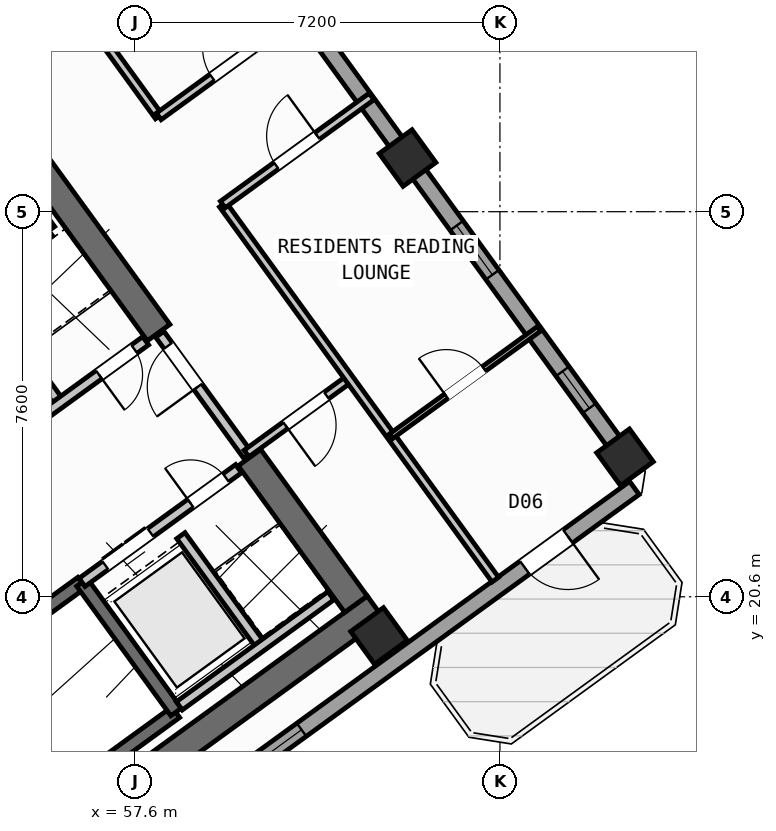
"""IFC4 building model, lengths in metres.
Left out: names, types, materials, properties, quantities, classifications, styles, units other than length and angle.
Written with IfcOpenShell. Run it as: python <this file> out.ifc"""

import sys

from ifc_helpers import new_model, si_unit, direction, frame, frame_2d, origin, origin_2d, place, context, subcontext, project, spatial, rectangle, hollow_rectangle, extrude, source, transform, mapped, element, fill, save


model = new_model("IFC4")
c1 = context("Model", 3, precision=1e-05, world=origin(), true_north=direction((0.0, 1.0)))
c2 = subcontext(c1, "Body", "Model", "MODEL_VIEW")
j1 = project(units=[si_unit("LENGTHUNIT", "METRE"), si_unit("PLANEANGLEUNIT", "RADIAN")], contexts=[c1])
p1 = place(None, origin())
s1 = spatial("IfcSite", under=j1, at=p1, CompositionType="ELEMENT")
p2 = place(p1, origin())
s2 = spatial("IfcBuilding", under=s1, at=p2, CompositionType="ELEMENT")
p3 = place(p2, frame((0.0, 0.0, 187.8)))
s3 = spatial("IfcBuildingStorey", under=s2, at=p3, CompositionType="ELEMENT", Elevation=187.8)
p4 = place(p3, frame((52.359, 13.14, 0.0), z_axis=(0.0, 0.0, 1.0), x_axis=(0.809014896919, 0.587788139183, 0.0)))
e1 = element("IfcWall", 1, at=p4, inside=s3, PredefinedType="SHEAR", context=c2, shape_type="SweptSolid", body=[
    extrude(rectangle(XDim=12.34, YDim=0.55, at=frame_2d((6.17, 0.0))), origin(), (0.0, 0.0, 1.0), 3.35),
])
p5 = place(p3, frame((61.958, 20.454, 0.0), z_axis=(0.0, 0.0, 1.0), x_axis=(-0.587802113096, 0.809004744015, 0.0)))
e2 = element("IfcWall", 2, at=p5, inside=s3, PredefinedType="SHEAR", context=c2, shape_type="SweptSolid", body=[
    extrude(rectangle(XDim=3.575, YDim=0.55, at=frame_2d((1.788, 0.0))), origin(), (0.0, 0.0, 1.0), 3.35),
])
p6 = place(p3, frame((58.064, 25.813, 0.0), z_axis=(0.0, 0.0, 1.0), x_axis=(-0.587764933797, 0.809031756236, 0.0)))
e3 = element("IfcWall", 3, at=p6, inside=s3, PredefinedType="SHEAR", context=c2, shape_type="SweptSolid", body=[
    extrude(rectangle(XDim=6.425, YDim=0.55, at=frame_2d((3.212, 0.0))), origin(), (0.0, 0.0, 1.0), 3.35),
])
m1 = source(origin(), c2, "Body", "SweptSolid", [
    extrude(hollow_rectangle(XDim=0.8, YDim=0.8, WallThickness=0.032, at=origin_2d()), origin(), (0.0, 0.0, 1.0), 3.6),
])
for number, where, z_axis, x_axis in (
    (4, (62.414, 19.827, 0.0), (0.0, 0.0, 1.0), (0.809, 0.588, 0.0)),
    (5, (67.268, 23.354, 0.0), (0.0, 0.0, 1.0), (0.809, 0.588, 0.0)),
    (6, (62.977, 29.259, 0.0), (0.0, 0.0, 1.0), (0.809, 0.588, 0.0)),
):
    element("IfcColumn", number, at=place(p3, frame(where, z_axis=z_axis, x_axis=x_axis)), inside=s3, PredefinedType="COLUMN", context=c2, shape_type="MappedRepresentation", body=[
        mapped(m1, transform((0.0, 0.0, 0.0), scale=1.0)),
    ])
p7 = place(p3, frame((54.81, 40.5, 0.0), z_axis=(0.0, 0.0, 1.0), x_axis=(0.587783625747, -0.809018176127, 0.0)))
e7 = element("IfcWall", 7, at=p7, inside=s3, PredefinedType="STANDARD", context=c2, shape_type="SweptSolid", body=[
    extrude(rectangle(XDim=21.587, YDim=0.32, at=frame_2d((10.794, 0.0))), origin(), (0.0, 0.0, 1.0), 2.825),
])
p8 = place(p7, frame((1.328, 0.0, 0.85)))
e8 = element("IfcOpeningElement", 8, at=p8, cuts=e7, PredefinedType="OPENING", context=c2, shape_type="SweptSolid", body=[
    extrude(rectangle(XDim=1.8, YDim=1.5, at=frame_2d((0.9, 0.75))), frame((0.0, 0.17, 0.0), z_axis=(0.0, -1.0, 0.0), x_axis=(1.0, 0.0, 0.0)), (0.0, 0.0, 1.0), 0.34),
])
p9 = place(p7, frame((4.695, 0.0, 1.0)))
e9 = element("IfcOpeningElement", 9, at=p9, cuts=e7, PredefinedType="OPENING", context=c2, shape_type="SweptSolid", body=[
    extrude(rectangle(XDim=0.9, YDim=1.25, at=frame_2d((0.45, 0.625))), frame((0.0, 0.17, 0.0), z_axis=(0.0, -1.0, 0.0), x_axis=(1.0, 0.0, 0.0)), (0.0, 0.0, 1.0), 0.34),
])
p10 = place(p7, frame((7.829, 0.0, 0.85)))
e10 = element("IfcOpeningElement", 10, at=p10, cuts=e7, PredefinedType="OPENING", context=c2, shape_type="SweptSolid", body=[
    extrude(rectangle(XDim=1.5, YDim=1.5, at=frame_2d((0.75, 0.75))), frame((0.0, 0.17, 0.0), z_axis=(0.0, -1.0, 0.0), x_axis=(1.0, 0.0, 0.0)), (0.0, 0.0, 1.0), 0.34),
])
p11 = place(p7, frame((15.542, 0.0, 0.95)))
e11 = element("IfcOpeningElement", 11, at=p11, cuts=e7, PredefinedType="OPENING", context=c2, shape_type="SweptSolid", body=[
    extrude(rectangle(XDim=1.2, YDim=1.4, at=frame_2d((0.6, 0.7))), frame((0.0, 0.17, 0.0), z_axis=(0.0, -1.0, 0.0), x_axis=(1.0, 0.0, 0.0)), (0.0, 0.0, 1.0), 0.34),
])
p12 = place(p7, frame((19.097, 0.0, 1.0)))
e12 = element("IfcOpeningElement", 12, at=p12, cuts=e7, PredefinedType="OPENING", context=c2, shape_type="SweptSolid", body=[
    extrude(rectangle(XDim=0.9, YDim=1.25, at=frame_2d((0.45, 0.625))), frame((0.0, 0.17, 0.0), z_axis=(0.0, -1.0, 0.0), x_axis=(1.0, 0.0, 0.0)), (0.0, 0.0, 1.0), 0.34),
])
p13 = place(p3, frame((67.454, 22.747, 0.0), z_axis=(0.0, 0.0, 1.0), x_axis=(-0.809021120468, -0.587779573171, 0.0)))
e13 = element("IfcWall", 13, at=p13, inside=s3, PredefinedType="STANDARD", context=c2, shape_type="SweptSolid", body=[
    extrude(rectangle(XDim=17.588, YDim=0.32, at=frame_2d((8.794, 0.0))), origin(), (0.0, 0.0, 1.0), 3.35),
])
p14 = place(p13, frame((1.624, 0.0, 0.0)))
e14 = element("IfcOpeningElement", 14, at=p14, cuts=e13, PredefinedType="OPENING", context=c2, shape_type="SweptSolid", body=[
    extrude(rectangle(XDim=1.05, YDim=2.15, at=frame_2d((0.525, 1.075))), frame((0.0, 0.17, 0.0), z_axis=(0.0, -1.0, 0.0), x_axis=(1.0, 0.0, 0.0)), (0.0, 0.0, 1.0), 0.34),
])
p15 = place(p13, frame((8.119, 0.0, 0.8)))
e15 = element("IfcOpeningElement", 15, at=p15, cuts=e13, PredefinedType="OPENING", context=c2, shape_type="SweptSolid", body=[
    extrude(rectangle(XDim=2.1, YDim=1.55, at=frame_2d((1.05, 0.775))), frame((0.0, 0.17, 0.0), z_axis=(0.0, -1.0, 0.0), x_axis=(1.0, 0.0, 0.0)), (0.0, 0.0, 1.0), 0.34),
])
p16 = place(p13, frame((13.369, 0.0, 0.8)))
e16 = element("IfcOpeningElement", 16, at=p16, cuts=e13, PredefinedType="OPENING", context=c2, shape_type="SweptSolid", body=[
    extrude(rectangle(XDim=2.1, YDim=1.55, at=frame_2d((1.05, 0.775))), frame((0.0, 0.17, 0.0), z_axis=(0.0, -1.0, 0.0), x_axis=(1.0, 0.0, 0.0)), (0.0, 0.0, 1.0), 0.34),
])
p17 = place(p3, frame((49.863, 23.44, 0.0), z_axis=(0.0, 0.0, 1.0), x_axis=(0.809003474932, 0.587803859759, 0.0)))
e17 = element("IfcWall", 17, at=p17, inside=s3, PredefinedType="SHEAR", context=c2, shape_type="SweptSolid", body=[
    extrude(rectangle(XDim=7.46, YDim=0.26, at=frame_2d((3.73, 0.0))), origin(), (0.0, 0.0, 1.0), 3.35),
])
p18 = place(p17, frame((0.36, 0.0, 0.0)))
e18 = element("IfcOpeningElement", 18, at=p18, cuts=e17, PredefinedType="OPENING", context=c2, shape_type="SweptSolid", body=[
    extrude(rectangle(XDim=0.86, YDim=2.05, at=frame_2d((0.43, 1.025))), frame((0.0, 0.14, 0.0), z_axis=(0.0, -1.0, 0.0), x_axis=(1.0, 0.0, 0.0)), (0.0, 0.0, 1.0), 0.28),
])
p19 = place(p3, frame((55.906, 27.831, 0.0), z_axis=(0.0, 0.0, 1.0), x_axis=(-0.587804123638, 0.809003283204, 0.0)))
e19 = element("IfcWall", 19, at=p19, inside=s3, PredefinedType="SHEAR", context=c2, shape_type="SweptSolid", body=[
    extrude(rectangle(XDim=3.16, YDim=0.26, at=frame_2d((1.58, 0.0))), origin(), (0.0, 0.0, 1.0), 3.35),
])
p20 = place(p3, frame((52.472, 14.013, 0.0), z_axis=(0.0, 0.0, 1.0), x_axis=(0.809028366311, 0.587769599847, 0.0)))
e20 = element("IfcWall", 20, at=p20, inside=s3, PredefinedType="SHEAR", context=c2, shape_type="SweptSolid", body=[
    extrude(rectangle(XDim=7.33, YDim=0.26, at=frame_2d((3.665, 0.0))), origin(), (0.0, 0.0, 1.0), 3.35),
])
p21 = place(p3, frame((50.615, 16.57, 0.0), z_axis=(0.0, 0.0, 1.0), x_axis=(0.809028366311, 0.587769599847, 0.0)))
e21 = element("IfcWall", 21, at=p21, inside=s3, PredefinedType="SHEAR", context=c2, shape_type="SweptSolid", body=[
    extrude(rectangle(XDim=7.33, YDim=0.26, at=frame_2d((3.665, 0.0))), origin(), (0.0, 0.0, 1.0), 3.35),
])
p22 = place(p21, frame((0.22, 0.0, 0.0)))
e22 = element("IfcOpeningElement", 22, at=p22, cuts=e21, PredefinedType="OPENING", context=c2, shape_type="SweptSolid", body=[
    extrude(rectangle(XDim=1.1, YDim=2.1, at=frame_2d((0.55, 1.05))), frame((0.0, 0.14, 0.0), z_axis=(0.0, -1.0, 0.0), x_axis=(1.0, 0.0, 0.0)), (0.0, 0.0, 1.0), 0.28),
])
p23 = place(p3, frame((58.41, 18.327, 0.0), z_axis=(0.0, 0.0, 1.0), x_axis=(-0.58776738483, 0.809029975545, 0.0)))
e23 = element("IfcWall", 23, at=p23, inside=s3, PredefinedType="SHEAR", context=c2, shape_type="SweptSolid", body=[
    extrude(rectangle(XDim=3.16, YDim=0.26, at=frame_2d((1.58, 0.0))), origin(), (0.0, 0.0, 1.0), 3.35),
])
p24 = place(p3, frame((56.553, 20.884, 0.0), z_axis=(0.0, 0.0, 1.0), x_axis=(0.809023564264, 0.58777620951, 0.0)))
e24 = element("IfcWall", 24, at=p24, inside=s3, PredefinedType="STANDARD", context=c2, shape_type="SweptSolid", body=[
    extrude(rectangle(XDim=3.818, YDim=0.2, at=frame_2d((1.909, 0.0))), origin(), (0.0, 0.0, 1.0), 3.34),
])
p25 = place(p24, frame((0.57, 0.0, 0.0)))
e25 = element("IfcOpeningElement", 25, at=p25, cuts=e24, PredefinedType="OPENING", context=c2, shape_type="SweptSolid", body=[
    extrude(rectangle(XDim=1.1, YDim=2.15, at=frame_2d((0.55, 1.075))), frame((0.0, 0.11, 0.0), z_axis=(0.0, -1.0, 0.0), x_axis=(1.0, 0.0, 0.0)), (0.0, 0.0, 1.0), 0.22),
])
p26 = place(p24, frame((2.65, 0.0, 0.0)))
e26 = element("IfcOpeningElement", 26, at=p26, cuts=e24, PredefinedType="OPENING", context=c2, shape_type="SweptSolid", body=[
    extrude(rectangle(XDim=0.86, YDim=2.05, at=frame_2d((0.43, 1.025))), frame((0.0, 0.11, 0.0), z_axis=(0.0, -1.0, 0.0), x_axis=(1.0, 0.0, 0.0)), (0.0, 0.0, 1.0), 0.22),
])
p27 = place(p3, frame((60.067, 19.655, 0.0), z_axis=(0.0, 0.0, 1.0), x_axis=(-0.587800520745, 0.809005900975, 0.0)))
e27 = element("IfcWall", 27, at=p27, inside=s3, PredefinedType="STANDARD", context=c2, shape_type="SweptSolid", body=[
    extrude(rectangle(XDim=2.66, YDim=0.2, at=frame_2d((1.33, 0.0))), origin(), (0.0, 0.0, 1.0), 3.34),
])
p28 = place(p3, frame((58.472, 18.447, 0.0), z_axis=(0.0, 0.0, 1.0), x_axis=(0.809018631237, 0.587782999339, 0.0)))
e28 = element("IfcWall", 28, at=p28, inside=s3, PredefinedType="STANDARD", context=c2, shape_type="SweptSolid", body=[
    extrude(rectangle(XDim=3.698, YDim=0.2, at=frame_2d((1.849, 0.0))), origin(), (0.0, 0.0, 1.0), 3.34),
])
p29 = place(p3, frame((56.111, 24.419, 0.0), z_axis=(0.0, 0.0, 1.0), x_axis=(-0.58777848983, 0.809021907548, 0.0)))
e29 = element("IfcWall", 29, at=p29, inside=s3, PredefinedType="STANDARD", context=c2, shape_type="SweptSolid", body=[
    extrude(rectangle(XDim=2.88, YDim=0.2, at=frame_2d((1.44, 0.0))), origin(), (0.0, 0.0, 1.0), 3.34),
])
p30 = place(p3, frame((53.425, 22.468, 0.0), z_axis=(0.0, 0.0, 1.0), x_axis=(0.809024377198, 0.587775090574, 0.0)))
e30 = element("IfcWall", 30, at=p30, inside=s3, PredefinedType="STANDARD", context=c2, shape_type="SweptSolid", body=[
    extrude(rectangle(XDim=5.418, YDim=0.2, at=frame_2d((2.709, 0.0))), origin(), (0.0, 0.0, 1.0), 3.34),
])
p31 = place(p30, frame((4.28, 0.0, 0.0)))
e31 = element("IfcOpeningElement", 31, at=p31, cuts=e30, PredefinedType="OPENING", context=c2, shape_type="SweptSolid", body=[
    extrude(rectangle(XDim=0.86, YDim=2.05, at=frame_2d((0.43, 1.025))), frame((0.0, 0.11, 0.0), z_axis=(0.0, -1.0, 0.0), x_axis=(1.0, 0.0, 0.0)), (0.0, 0.0, 1.0), 0.22),
])
p32 = place(p30, frame((1.45, 0.0, 0.0)))
e32 = element("IfcOpeningElement", 32, at=p32, cuts=e30, PredefinedType="OPENING", context=c2, shape_type="SweptSolid", body=[
    extrude(rectangle(XDim=0.86, YDim=2.05, at=frame_2d((0.43, 1.025))), frame((0.0, 0.11, 0.0), z_axis=(0.0, -1.0, 0.0), x_axis=(1.0, 0.0, 0.0)), (0.0, 0.0, 1.0), 0.22),
])
p33 = place(p3, frame((59.827, 23.386, 0.0), z_axis=(0.0, 0.0, 1.0), x_axis=(-0.587803840107, 0.809003489211, 0.0)))
e33 = element("IfcWall", 33, at=p33, inside=s3, PredefinedType="STANDARD", context=c2, shape_type="SweptSolid", body=[
    extrude(rectangle(XDim=2.96, YDim=0.2, at=frame_2d((1.48, 0.0))), origin(), (0.0, 0.0, 1.0), 3.34),
])
p34 = place(p33, frame((1.68, 0.0, 0.0)))
e34 = element("IfcOpeningElement", 34, at=p34, cuts=e33, PredefinedType="OPENING", context=c2, shape_type="SweptSolid", body=[
    extrude(rectangle(XDim=1.0, YDim=2.1, at=frame_2d((0.5, 1.05))), frame((0.0, 0.11, 0.0), z_axis=(0.0, -1.0, 0.0), x_axis=(1.0, 0.0, 0.0)), (0.0, 0.0, 1.0), 0.22),
])
p35 = place(p3, frame((59.798, 23.427, 0.0), z_axis=(0.0, 0.0, 1.0), x_axis=(0.809034604122, 0.587761013791, 0.0)))
e35 = element("IfcWall", 35, at=p35, inside=s3, PredefinedType="PARTITIONING", context=c2, shape_type="SweptSolid", body=[
    extrude(rectangle(XDim=2.51, YDim=0.16, at=frame_2d((1.255, 0.0))), origin(), (0.0, 0.0, 1.0), 3.34),
])
p36 = place(p35, frame((0.95, 0.0, 0.0)))
e36 = element("IfcOpeningElement", 36, at=p36, cuts=e35, PredefinedType="OPENING", context=c2, shape_type="SweptSolid", body=[
    extrude(rectangle(XDim=1.0, YDim=2.1, at=frame_2d((0.5, 1.05))), frame((0.0, 0.09, 0.0), z_axis=(0.0, -1.0, 0.0), x_axis=(1.0, 0.0, 0.0)), (0.0, 0.0, 1.0), 0.18),
])
p37 = place(p3, frame((64.709, 20.938, 0.0), z_axis=(0.0, 0.0, 1.0), x_axis=(-0.587776590479, 0.80902328748, 0.0)))
e37 = element("IfcWall", 37, at=p37, inside=s3, PredefinedType="PARTITIONING", context=c2, shape_type="SweptSolid", body=[
    extrude(rectangle(XDim=9.15, YDim=0.16, at=frame_2d((4.575, 0.0))), origin(), (0.0, 0.0, 1.0), 3.34),
])
p38 = place(p3, frame((58.067, 30.08, 0.0), z_axis=(0.0, 0.0, 1.0), x_axis=(-0.587787785243, 0.809015154073, 0.0)))
e38 = element("IfcWall", 38, at=p38, inside=s3, PredefinedType="PARTITIONING", context=c2, shape_type="SweptSolid", body=[
    extrude(rectangle(XDim=10.4, YDim=0.16, at=frame_2d((5.2, 0.0))), origin(), (0.0, 0.0, 1.0), 3.34),
])
p39 = place(p3, frame((59.331, 28.341, 0.0), z_axis=(0.0, 0.0, 1.0), x_axis=(0.809003564202, 0.587803736896, 0.0)))
e39 = element("IfcWall", 39, at=p39, inside=s3, PredefinedType="PARTITIONING", context=c2, shape_type="SweptSolid", body=[
    extrude(rectangle(XDim=3.63, YDim=0.16, at=frame_2d((1.815, 0.0))), origin(), (0.0, 0.0, 1.0), 3.34),
])
p40 = place(p39, frame((1.305, 0.0, 0.0)))
e40 = element("IfcOpeningElement", 40, at=p40, cuts=e39, PredefinedType="OPENING", context=c2, shape_type="SweptSolid", body=[
    extrude(rectangle(XDim=1.0, YDim=2.1, at=frame_2d((0.5, 1.05))), frame((0.0, 0.09, 0.0), z_axis=(0.0, -1.0, 0.0), x_axis=(1.0, 0.0, 0.0)), (0.0, 0.0, 1.0), 0.18),
])
p41 = place(p3, frame((58.067, 30.08, 0.0), z_axis=(0.0, 0.0, 1.0), x_axis=(0.809012309495, 0.587791700422, 0.0)))
e41 = element("IfcWall", 41, at=p41, inside=s3, PredefinedType="PARTITIONING", context=c2, shape_type="SweptSolid", body=[
    extrude(rectangle(XDim=3.63, YDim=0.16, at=frame_2d((1.815, 0.0))), origin(), (0.0, 0.0, 1.0), 3.34),
])
p42 = place(p41, frame((1.305, 0.0, 0.0)))
e42 = element("IfcOpeningElement", 42, at=p42, cuts=e41, PredefinedType="OPENING", context=c2, shape_type="SweptSolid", body=[
    extrude(rectangle(XDim=1.0, YDim=2.1, at=frame_2d((0.5, 1.05))), frame((0.0, 0.09, 0.0), z_axis=(0.0, -1.0, 0.0), x_axis=(1.0, 0.0, 0.0)), (0.0, 0.0, 1.0), 0.18),
])
p43 = place(p3, frame((62.653, 23.768, 0.0), z_axis=(0.0, 0.0, 1.0), x_axis=(0.809037198293, 0.58775744298, 0.0)))
e43 = element("IfcWall", 43, at=p43, inside=s3, PredefinedType="PARTITIONING", context=c2, shape_type="SweptSolid", body=[
    extrude(rectangle(XDim=3.61, YDim=0.11, at=frame_2d((1.805, 0.0))), origin(), (0.0, 0.0, 1.0), 3.34),
])
p44 = place(p43, frame((1.345, 0.0, 0.0)))
e44 = element("IfcOpeningElement", 44, at=p44, cuts=e43, PredefinedType="OPENING", context=c2, shape_type="SweptSolid", body=[
    extrude(rectangle(XDim=0.92, YDim=2.08, at=frame_2d((0.46, 1.04))), frame((0.0, 0.065, 0.0), z_axis=(0.0, -1.0, 0.0), x_axis=(1.0, 0.0, 0.0)), (0.0, 0.0, 1.0), 0.13),
])
m2 = source(origin(), c2, "Body", "SweptSolid", [
    extrude(rectangle(XDim=1.05, YDim=2.15, at=frame_2d((0.525, 1.075))), frame((0.0, 0.025, 0.0), z_axis=(0.0, -1.0, 0.0), x_axis=(1.0, 0.0, 0.0)), (0.0, 0.0, 1.0), 0.05),
])
p45 = place(p14, origin())
e45 = element("IfcDoor", 45, at=p45, inside=s3, OperationType="SINGLE_SWING_LEFT", PredefinedType="DOOR", context=c2, shape_type="MappedRepresentation", body=[
    mapped(m2, transform((0.0, 0.0, 0.0), scale=1.0)),
])
fill(e14, e45)
m3 = source(origin(), c2, "Body", "SweptSolid", [
    extrude(rectangle(XDim=1.2, YDim=1.4, at=frame_2d((0.6, 0.7))), frame((0.0, 0.03, 0.0), z_axis=(0.0, -1.0, 0.0), x_axis=(1.0, 0.0, 0.0)), (0.0, 0.0, 1.0), 0.06),
])
p46 = place(p11, origin())
e46 = element("IfcWindow", 46, at=p46, inside=s3, PartitioningType="SINGLE_PANEL", PredefinedType="WINDOW", context=c2, shape_type="MappedRepresentation", body=[
    mapped(m3, transform((0.0, 0.0, 0.0), scale=1.0)),
])
fill(e11, e46)
m4 = source(origin(), c2, "Body", "SweptSolid", [
    extrude(rectangle(XDim=0.9, YDim=1.25, at=frame_2d((0.45, 0.625))), frame((0.0, 0.03, 0.0), z_axis=(0.0, -1.0, 0.0), x_axis=(1.0, 0.0, 0.0)), (0.0, 0.0, 1.0), 0.06),
])
p47 = place(p12, origin())
e47 = element("IfcWindow", 47, at=p47, inside=s3, PartitioningType="SINGLE_PANEL", PredefinedType="WINDOW", context=c2, shape_type="MappedRepresentation", body=[
    mapped(m4, transform((0.0, 0.0, 0.0), scale=1.0)),
])
fill(e12, e47)
m5 = source(origin(), c2, "Body", "SweptSolid", [
    extrude(rectangle(XDim=2.1, YDim=1.55, at=frame_2d((1.05, 0.775))), frame((0.0, 0.03, 0.0), z_axis=(0.0, -1.0, 0.0), x_axis=(1.0, 0.0, 0.0)), (0.0, 0.0, 1.0), 0.06),
])
p48 = place(p15, origin())
e48 = element("IfcWindow", 48, at=p48, inside=s3, PartitioningType="SINGLE_PANEL", PredefinedType="WINDOW", context=c2, shape_type="MappedRepresentation", body=[
    mapped(m5, transform((0.0, 0.0, 0.0), scale=1.0)),
])
fill(e15, e48)
m6 = source(origin(), c2, "Body", "SweptSolid", [
    extrude(rectangle(XDim=1.1, YDim=2.15, at=frame_2d((0.55, 1.075))), frame((0.0, 0.025, 0.0), z_axis=(0.0, -1.0, 0.0), x_axis=(1.0, 0.0, 0.0)), (0.0, 0.0, 1.0), 0.05),
])
p49 = place(p25, origin())
e49 = element("IfcDoor", 49, at=p49, inside=s3, OperationType="DOUBLE_DOOR_SLIDING", PredefinedType="DOOR", context=c2, shape_type="MappedRepresentation", body=[
    mapped(m6, transform((0.0, 0.0, 0.0), scale=1.0)),
])
fill(e25, e49)
m7 = source(origin(), c2, "Body", "SweptSolid", [
    extrude(rectangle(XDim=0.86, YDim=2.05, at=frame_2d((0.43, 1.025))), frame((0.0, 0.025, 0.0), z_axis=(0.0, -1.0, 0.0), x_axis=(1.0, 0.0, 0.0)), (0.0, 0.0, 1.0), 0.05),
])
p50 = place(p26, origin())
e50 = element("IfcDoor", 50, at=p50, inside=s3, OperationType="SINGLE_SWING_LEFT", PredefinedType="DOOR", context=c2, shape_type="MappedRepresentation", body=[
    mapped(m7, transform((0.0, 0.0, 0.0), scale=1.0)),
])
fill(e26, e50)
p51 = place(p31, frame((0.86, 0.0, 0.0), z_axis=(0.0, 0.0, 1.0), x_axis=(-1.0, 0.0, 0.0)))
e51 = element("IfcDoor", 51, at=p51, inside=s3, OperationType="SINGLE_SWING_RIGHT", PredefinedType="DOOR", context=c2, shape_type="MappedRepresentation", body=[
    mapped(m7, transform((0.0, 0.0, 0.0), scale=1.0)),
])
fill(e31, e51)
m8 = source(origin(), c2, "Body", "SweptSolid", [
    extrude(rectangle(XDim=1.0, YDim=2.1, at=frame_2d((0.5, 1.05))), frame((0.0, 0.025, 0.0), z_axis=(0.0, -1.0, 0.0), x_axis=(1.0, 0.0, 0.0)), (0.0, 0.0, 1.0), 0.05),
])
p52 = place(p36, frame((1.0, 0.0, 0.0), z_axis=(0.0, 0.0, 1.0), x_axis=(-1.0, 0.0, 0.0)))
e52 = element("IfcDoor", 52, at=p52, inside=s3, OperationType="SINGLE_SWING_RIGHT", PredefinedType="DOOR", context=c2, shape_type="MappedRepresentation", body=[
    mapped(m8, transform((0.0, 0.0, 0.0), scale=1.0)),
])
fill(e36, e52)
p53 = place(p34, origin())
e53 = element("IfcDoor", 53, at=p53, inside=s3, OperationType="SINGLE_SWING_LEFT", PredefinedType="DOOR", context=c2, shape_type="MappedRepresentation", body=[
    mapped(m8, transform((0.0, 0.0, 0.0), scale=1.0)),
])
fill(e34, e53)
p54 = place(p42, origin())
e54 = element("IfcDoor", 54, at=p54, inside=s3, OperationType="SINGLE_SWING_RIGHT", PredefinedType="DOOR", context=c2, shape_type="MappedRepresentation", body=[
    mapped(m8, transform((0.0, 0.0, 0.0), scale=1.0)),
])
fill(e42, e54)
p55 = place(p40, origin())
e55 = element("IfcDoor", 55, at=p55, inside=s3, OperationType="SINGLE_SWING_RIGHT", PredefinedType="DOOR", context=c2, shape_type="MappedRepresentation", body=[
    mapped(m8, transform((0.0, 0.0, 0.0), scale=1.0)),
])
fill(e40, e55)
m9 = source(origin(), c2, "Body", "SweptSolid", [
    extrude(rectangle(XDim=0.92, YDim=2.08, at=frame_2d((0.46, 1.04))), frame((0.0, 0.025, 0.0), z_axis=(0.0, -1.0, 0.0), x_axis=(1.0, 0.0, 0.0)), (0.0, 0.0, 1.0), 0.05),
])
p56 = place(p44, origin())
e56 = element("IfcDoor", 56, at=p56, inside=s3, OperationType="SINGLE_SWING_LEFT", PredefinedType="DOOR", context=c2, shape_type="MappedRepresentation", body=[
    mapped(m9, transform((0.0, 0.0, 0.0), scale=1.0)),
])
fill(e44, e56)
save(model, sys.argv[1])
